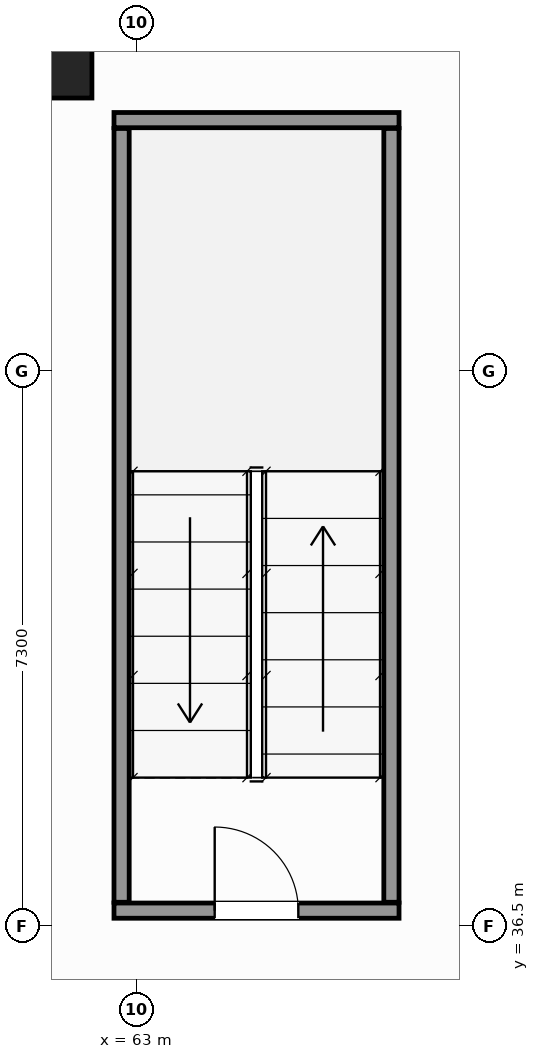
"""IFC4 building model, lengths in metres.
Left out: names, types, materials, properties, quantities, classifications, styles, units other than length and angle.
Written with IfcOpenShell. Run it as: python <this file> out.ifc"""

import sys

from ifc_helpers import new_model, si_unit, direction, frame, frame_2d, origin, origin_2d, place, context, subcontext, project, spatial, rectangle, hollow_circle, extrude, source, transform, mapped, element, fill, save


model = new_model("IFC4")
c1 = context("Model", 3, precision=1e-05, world=origin(), true_north=direction((0.0, 1.0)))
c2 = subcontext(c1, "Body", "Model", "MODEL_VIEW")
j1 = project(units=[si_unit("LENGTHUNIT", "METRE"), si_unit("PLANEANGLEUNIT", "RADIAN")], contexts=[c1])
p1 = place(None, origin())
s1 = spatial("IfcSite", under=j1, at=p1, CompositionType="ELEMENT")
p2 = place(p1, origin())
s2 = spatial("IfcBuilding", under=s1, at=p2, CompositionType="ELEMENT")
p3 = place(p2, frame((0.0, 0.0, 10.0)))
s3 = spatial("IfcBuildingStorey", under=s2, at=p3, CompositionType="ELEMENT", Elevation=10.0)
m1 = source(origin(), c2, "Body", "SweptSolid", [
    extrude(hollow_circle(Radius=0.61, WallThickness=0.05, at=origin_2d()), origin(), (0.0, 0.0, 1.0), 4.4),
])
p4 = place(p3, frame((61.8, 48.0, 0.0), z_axis=(0.0, 0.0, 1.0), x_axis=(1.0, 0.0, 0.0)))
e1 = element("IfcColumn", 1, at=p4, inside=s3, PredefinedType="COLUMN", context=c2, shape_type="MappedRepresentation", body=[
    mapped(m1, transform((0.0, 0.0, 0.0), scale=1.0)),
])
p5 = place(p3, frame((62.7, 36.7, 0.0), z_axis=(0.0, 0.0, 1.0), x_axis=(1.0, 0.0, 0.0)))
e2 = element("IfcWall", 2, at=p5, inside=s3, PredefinedType="SOLIDWALL", context=c2, shape_type="SweptSolid", body=[
    extrude(rectangle(XDim=3.75, YDim=0.2, at=frame_2d((1.875, 0.0))), origin(), (0.0, 0.0, 1.0), 4.4),
])
p6 = place(p5, frame((1.325, 0.0, 0.0)))
e3 = element("IfcOpeningElement", 3, at=p6, cuts=e2, PredefinedType="OPENING", context=c2, shape_type="SweptSolid", body=[
    extrude(rectangle(XDim=1.1, YDim=2.15, at=frame_2d((0.55, 1.075))), frame((0.0, 0.11, 0.0), z_axis=(0.0, -1.0, 0.0), x_axis=(1.0, 0.0, 0.0)), (0.0, 0.0, 1.0), 0.22),
])
p7 = place(p3, frame((62.7, 47.1, 0.0), z_axis=(0.0, 0.0, 1.0), x_axis=(1.0, 0.0, 0.0)))
e4 = element("IfcWall", 4, at=p7, inside=s3, PredefinedType="SOLIDWALL", context=c2, shape_type="SweptSolid", body=[
    extrude(rectangle(XDim=3.75, YDim=0.2, at=frame_2d((1.875, 0.0))), origin(), (0.0, 0.0, 1.0), 4.4),
])
for number, where, z_axis, x_axis in (
    (5, (62.8, 36.81, 0.0), (0.0, 0.0, 1.0), (0.0, 1.0, 0.0)),
    (6, (66.35, 36.81, 0.0), (0.0, 0.0, 1.0), (0.0, 1.0, 0.0)),
):
    element("IfcWall", number, at=place(p3, frame(where, z_axis=z_axis, x_axis=x_axis)), inside=s3, PredefinedType="SOLIDWALL", context=c2, shape_type="SweptSolid", body=[
        extrude(rectangle(XDim=10.18, YDim=0.2, at=frame_2d((5.09, 0.0))), origin(), (0.0, 0.0, 1.0), 4.4),
    ])
m2 = source(origin(), c2, "Body", "SweptSolid", [
    extrude(rectangle(XDim=1.1, YDim=2.15, at=frame_2d((0.55, 1.075))), frame((0.0, 0.025, 0.0), z_axis=(0.0, -1.0, 0.0), x_axis=(1.0, 0.0, 0.0)), (0.0, 0.0, 1.0), 0.05),
])
p8 = place(p6, origin())
e7 = element("IfcDoor", 7, at=p8, inside=s3, OperationType="SINGLE_SWING_RIGHT", PredefinedType="DOOR", context=c2, shape_type="MappedRepresentation", body=[
    mapped(m2, transform((0.0, 0.0, 0.0), scale=1.0)),
])
fill(e3, e7)
save(model, sys.argv[1])
